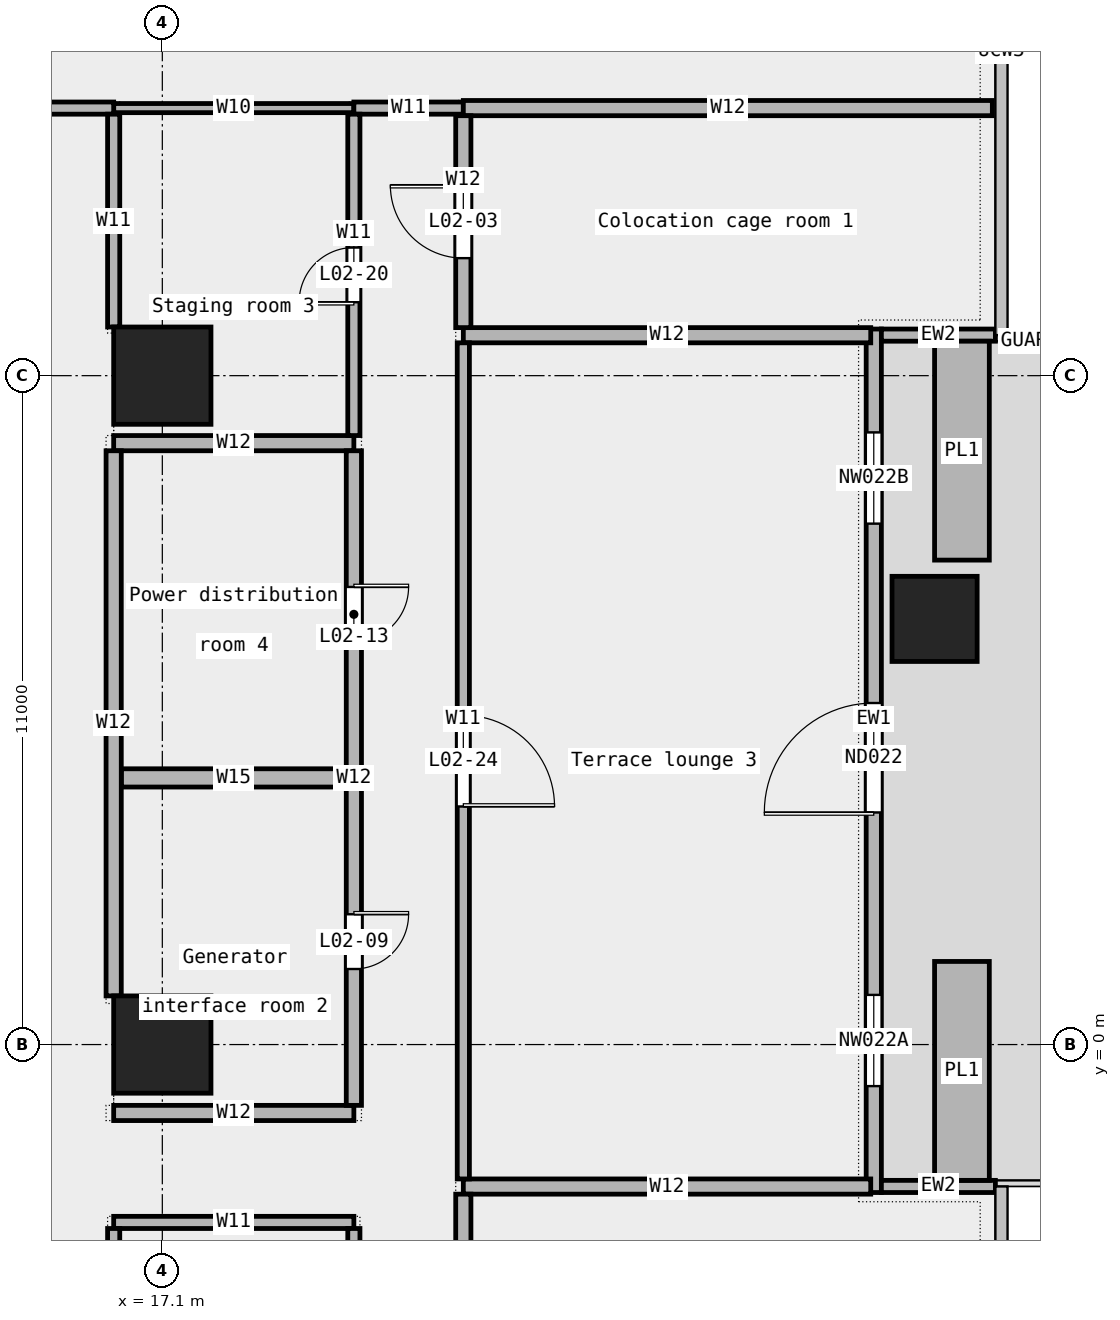
"""IFC4 building model, lengths in metres.
Left out: names, types, materials, properties, quantities, classifications, styles, units other than length and angle.
Written with IfcOpenShell. Run it as: python <this file> out.ifc"""

import sys

from ifc_helpers import new_model, si_unit, direction, frame, frame_2d, origin, origin_2d, place, context, subcontext, project, spatial, rectangle, extrude, element, fill, save


model = new_model("IFC4")
c1 = context("Model", 3, precision=1e-05, world=origin(), true_north=direction((0.0, 1.0)))
c2 = subcontext(c1, "Body", "Model", "MODEL_VIEW")
j1 = project(units=[si_unit("LENGTHUNIT", "METRE"), si_unit("PLANEANGLEUNIT", "RADIAN")], contexts=[c1])
p1 = place(None, origin())
s1 = spatial("IfcSite", under=j1, at=p1, CompositionType="ELEMENT")
p2 = place(p1, origin())
s2 = spatial("IfcBuilding", under=s1, at=p2, CompositionType="ELEMENT")
p3 = place(p2, frame((0.0, 0.0, 14.5)))
s3 = spatial("IfcBuildingStorey", under=s2, at=p3, CompositionType="ELEMENT", Elevation=14.5)
p4 = place(p3, frame((29.8, 7.0, 0.0), z_axis=(0.0, 0.0, 1.0), x_axis=(1.0, 0.0, 0.0)))
e1 = element("IfcColumn", 1, at=p4, inside=s3, PredefinedType="COLUMN", context=c2, shape_type="SweptSolid", body=[
    extrude(rectangle(XDim=1.4, YDim=1.4, at=origin_2d()), origin(), (0.0, 0.0, 1.0), 5.0),
])
for number, where, z_axis, x_axis in (
    (2, (17.1, 0.0, 0.0), (0.0, 0.0, 1.0), (1.0, 0.0, 0.0)),
    (3, (17.1, 11.0, 0.0), (0.0, 0.0, 1.0), (1.0, 0.0, 0.0)),
):
    element("IfcColumn", number, at=place(p3, frame(where, z_axis=z_axis, x_axis=x_axis)), inside=s3, PredefinedType="COLUMN", context=c2, shape_type="SweptSolid", body=[
        extrude(rectangle(XDim=1.6, YDim=1.6, at=origin_2d()), origin(), (0.0, 0.0, 1.0), 5.0),
    ])
p5 = place(p3, frame((28.8, -2.433, 0.0), z_axis=(0.0, 0.0, 1.0), x_axis=(0.0, 1.0, 0.0)))
e4 = element("IfcWall", 4, at=p5, inside=s3, PredefinedType="STANDARD", context=c2, shape_type="SweptSolid", body=[
    extrude(rectangle(XDim=14.2, YDim=0.25, at=frame_2d((7.1, 0.0))), origin(), (0.0, 0.0, 1.0), 5.0),
])
p6 = place(p5, frame((1.75, 0.0, 0.45)))
e5 = element("IfcOpeningElement", 5, at=p6, cuts=e4, PredefinedType="OPENING", context=c2, shape_type="SweptSolid", body=[
    extrude(rectangle(XDim=1.5, YDim=3.0, at=frame_2d((0.75, 1.5))), frame((0.0, 0.137, 0.0), z_axis=(0.0, -1.0, 0.0), x_axis=(1.0, 0.0, 0.0)), (0.0, 0.0, 1.0), 0.274),
])
p7 = place(p5, frame((6.25, 0.0, 0.0)))
e6 = element("IfcOpeningElement", 6, at=p7, cuts=e4, PredefinedType="OPENING", context=c2, shape_type="SweptSolid", body=[
    extrude(rectangle(XDim=1.8, YDim=2.4, at=frame_2d((0.9, 1.2))), frame((0.0, 0.137, 0.0), z_axis=(0.0, -1.0, 0.0), x_axis=(1.0, 0.0, 0.0)), (0.0, 0.0, 1.0), 0.274),
])
p8 = place(p5, frame((11.0, 0.0, 0.45)))
e7 = element("IfcOpeningElement", 7, at=p8, cuts=e4, PredefinedType="OPENING", context=c2, shape_type="SweptSolid", body=[
    extrude(rectangle(XDim=1.5, YDim=3.0, at=frame_2d((0.75, 1.5))), frame((0.0, 0.137, 0.0), z_axis=(0.0, -1.0, 0.0), x_axis=(1.0, 0.0, 0.0)), (0.0, 0.0, 1.0), 0.274),
])
for number, where, z_axis, x_axis in (
    (8, (30.8, -2.333, 0.0), (0.0, 0.0, 1.0), (-1.0, 0.0, 0.0)),
    (9, (30.8, 11.667, 0.0), (0.0, 0.0, 1.0), (-1.0, 0.0, 0.0)),
):
    element("IfcWall", number, at=place(p3, frame(where, z_axis=z_axis, x_axis=x_axis)), inside=s3, PredefinedType="STANDARD", context=c2, shape_type="SweptSolid", body=[
        extrude(rectangle(XDim=1.875, YDim=0.2, at=frame_2d((0.938, 0.0))), origin(), (0.0, 0.0, 1.0), 5.0),
    ])
for number, where, z_axis, x_axis in (
    (10, (30.25, -2.233, 0.0), (0.0, 0.0, 1.0), (0.0, 1.0, 0.0)),
    (11, (30.25, 7.967, 0.0), (0.0, 0.0, 1.0), (0.0, 1.0, 0.0)),
):
    element("IfcWall", number, at=place(p3, frame(where, z_axis=z_axis, x_axis=x_axis)), inside=s3, PredefinedType="STANDARD", context=c2, shape_type="SweptSolid", body=[
        extrude(rectangle(XDim=3.6, YDim=0.9, at=frame_2d((1.8, 0.0))), origin(), (0.0, 0.0, 1.0), 0.7),
    ])
p9 = place(p3, frame((16.3, -2.925, 0.0), z_axis=(0.0, 0.0, 1.0), x_axis=(1.0, 0.0, 0.0)))
e12 = element("IfcWall", 12, at=p9, inside=s3, PredefinedType="PARTITIONING", context=c2, shape_type="SweptSolid", body=[
    extrude(rectangle(XDim=3.95, YDim=0.2, at=frame_2d((1.975, 0.0))), origin(), (0.0, 0.0, 1.0), 5.0),
])
p10 = place(p3, frame((22.05, -2.335, 0.0), z_axis=(0.0, 0.0, 1.0), x_axis=(1.0, 0.0, 0.0)))
e13 = element("IfcWall", 13, at=p10, inside=s3, PredefinedType="PARTITIONING", context=c2, shape_type="SweptSolid", body=[
    extrude(rectangle(XDim=6.7, YDim=0.25, at=frame_2d((3.35, 0.0))), origin(), (0.0, 0.0, 1.0), 5.0),
])
p11 = place(p3, frame((16.3, -1.125, 0.0), z_axis=(0.0, 0.0, 1.0), x_axis=(1.0, 0.0, 0.0)))
e14 = element("IfcWall", 14, at=p11, inside=s3, PredefinedType="PARTITIONING", context=c2, shape_type="SweptSolid", body=[
    extrude(rectangle(XDim=3.95, YDim=0.25, at=frame_2d((1.975, 0.0))), origin(), (0.0, 0.0, 1.0), 5.0),
])
p12 = place(p3, frame((16.425, 4.385, 0.0), z_axis=(0.0, 0.0, 1.0), x_axis=(1.0, 0.0, 0.0)))
e15 = element("IfcWall", 15, at=p12, inside=s3, PredefinedType="PARTITIONING", context=c2, shape_type="SweptSolid", body=[
    extrude(rectangle(XDim=3.7, YDim=0.3, at=frame_2d((1.85, 0.0))), origin(), (0.0, 0.0, 1.0), 5.0),
])
p13 = place(p3, frame((16.3, 9.89, 0.0), z_axis=(0.0, 0.0, 1.0), x_axis=(1.0, 0.0, 0.0)))
e16 = element("IfcWall", 16, at=p13, inside=s3, PredefinedType="PARTITIONING", context=c2, shape_type="SweptSolid", body=[
    extrude(rectangle(XDim=3.95, YDim=0.25, at=frame_2d((1.975, 0.0))), origin(), (0.0, 0.0, 1.0), 5.0),
])
p14 = place(p3, frame((22.05, 11.665, 0.0), z_axis=(0.0, 0.0, 1.0), x_axis=(1.0, 0.0, 0.0)))
e17 = element("IfcWall", 17, at=p14, inside=s3, PredefinedType="PARTITIONING", context=c2, shape_type="SweptSolid", body=[
    extrude(rectangle(XDim=6.7, YDim=0.25, at=frame_2d((3.35, 0.0))), origin(), (0.0, 0.0, 1.0), 5.0),
])
p15 = place(p3, frame((16.3, 15.4, 0.0), z_axis=(0.0, 0.0, 1.0), x_axis=(1.0, 0.0, 0.0)))
e18 = element("IfcWall", 18, at=p15, inside=s3, PredefinedType="PARTITIONING", context=c2, shape_type="SweptSolid", body=[
    extrude(rectangle(XDim=3.95, YDim=0.15, at=frame_2d((1.975, 0.0))), origin(), (0.0, 0.0, 1.0), 5.0),
])
p16 = place(p3, frame((9.165, 15.4, 0.0), z_axis=(0.0, 0.0, 1.0), x_axis=(1.0, 0.0, 0.0)))
e19 = element("IfcWall", 19, at=p16, inside=s3, PredefinedType="PARTITIONING", context=c2, shape_type="SweptSolid", body=[
    extrude(rectangle(XDim=7.135, YDim=0.2, at=frame_2d((3.567, 0.0))), origin(), (0.0, 0.0, 1.0), 5.0),
])
p17 = place(p16, frame((2.667, 0.0, 0.0)))
e20 = element("IfcOpeningElement", 20, at=p17, cuts=e19, PredefinedType="OPENING", context=c2, shape_type="SweptSolid", body=[
    extrude(rectangle(XDim=1.8, YDim=2.1, at=frame_2d((0.9, 1.05))), frame((0.0, 0.112, 0.0), z_axis=(0.0, -1.0, 0.0), x_axis=(1.0, 0.0, 0.0)), (0.0, 0.0, 1.0), 0.224),
])
p18 = place(p3, frame((20.25, 15.4, 0.0), z_axis=(0.0, 0.0, 1.0), x_axis=(1.0, 0.0, 0.0)))
e21 = element("IfcWall", 21, at=p18, inside=s3, PredefinedType="PARTITIONING", context=c2, shape_type="SweptSolid", body=[
    extrude(rectangle(XDim=1.8, YDim=0.2, at=frame_2d((0.9, 0.0))), origin(), (0.0, 0.0, 1.0), 5.0),
])
p19 = place(p3, frame((22.05, 15.4, 0.0), z_axis=(0.0, 0.0, 1.0), x_axis=(1.0, 0.0, 0.0)))
e22 = element("IfcWall", 22, at=p19, inside=s3, PredefinedType="PARTITIONING", context=c2, shape_type="SweptSolid", body=[
    extrude(rectangle(XDim=8.7, YDim=0.25, at=frame_2d((4.35, 0.0))), origin(), (0.0, 0.0, 1.0), 5.0),
])
p20 = place(p3, frame((16.3, -9.0, 0.0), z_axis=(0.0, 0.0, 1.0), x_axis=(0.0, 1.0, 0.0)))
e23 = element("IfcWall", 23, at=p20, inside=s3, PredefinedType="PARTITIONING", context=c2, shape_type="SweptSolid", body=[
    extrude(rectangle(XDim=5.975, YDim=0.2, at=frame_2d((2.988, 0.0))), origin(), (0.0, 0.0, 1.0), 5.0),
])
p21 = place(p3, frame((16.3, 11.8, 0.0), z_axis=(0.0, 0.0, 1.0), x_axis=(0.0, 1.0, 0.0)))
e24 = element("IfcWall", 24, at=p21, inside=s3, PredefinedType="PARTITIONING", context=c2, shape_type="SweptSolid", body=[
    extrude(rectangle(XDim=3.5, YDim=0.2, at=frame_2d((1.75, 0.0))), origin(), (0.0, 0.0, 1.0), 5.0),
])
p22 = place(p3, frame((16.3, 0.8, 0.0), z_axis=(0.0, 0.0, 1.0), x_axis=(0.0, 1.0, 0.0)))
e25 = element("IfcWall", 25, at=p22, inside=s3, PredefinedType="PARTITIONING", context=c2, shape_type="SweptSolid", body=[
    extrude(rectangle(XDim=8.965, YDim=0.25, at=frame_2d((4.482, 0.0))), origin(), (0.0, 0.0, 1.0), 5.0),
])
p23 = place(p3, frame((20.25, -9.0, 0.0), z_axis=(0.0, 0.0, 1.0), x_axis=(0.0, 1.0, 0.0)))
e26 = element("IfcWall", 26, at=p23, inside=s3, PredefinedType="PARTITIONING", context=c2, shape_type="SweptSolid", body=[
    extrude(rectangle(XDim=5.975, YDim=0.2, at=frame_2d((2.988, 0.0))), origin(), (0.0, 0.0, 1.0), 5.0),
])
p24 = place(p23, frame((2.538, 0.0, 0.0)))
e27 = element("IfcOpeningElement", 27, at=p24, cuts=e26, PredefinedType="OPENING", context=c2, shape_type="SweptSolid", body=[
    extrude(rectangle(XDim=0.9, YDim=2.1, at=frame_2d((0.45, 1.05))), frame((0.0, 0.112, 0.0), z_axis=(0.0, -1.0, 0.0), x_axis=(1.0, 0.0, 0.0)), (0.0, 0.0, 1.0), 0.224),
])
p25 = place(p3, frame((20.25, 10.015, 0.0), z_axis=(0.0, 0.0, 1.0), x_axis=(0.0, 1.0, 0.0)))
e28 = element("IfcWall", 28, at=p25, inside=s3, PredefinedType="PARTITIONING", context=c2, shape_type="SweptSolid", body=[
    extrude(rectangle(XDim=5.285, YDim=0.2, at=frame_2d((2.643, 0.0))), origin(), (0.0, 0.0, 1.0), 5.0),
])
p26 = place(p25, frame((2.192, 0.0, 0.0)))
e29 = element("IfcOpeningElement", 29, at=p26, cuts=e28, PredefinedType="OPENING", context=c2, shape_type="SweptSolid", body=[
    extrude(rectangle(XDim=0.9, YDim=2.1, at=frame_2d((0.45, 1.05))), frame((0.0, 0.112, 0.0), z_axis=(0.0, -1.0, 0.0), x_axis=(1.0, 0.0, 0.0)), (0.0, 0.0, 1.0), 0.224),
])
p27 = place(p3, frame((20.25, -1.0, 0.0), z_axis=(0.0, 0.0, 1.0), x_axis=(0.0, 1.0, 0.0)))
e30 = element("IfcWall", 30, at=p27, inside=s3, PredefinedType="PARTITIONING", context=c2, shape_type="SweptSolid", body=[
    extrude(rectangle(XDim=10.765, YDim=0.25, at=frame_2d((5.382, 0.0))), origin(), (0.0, 0.0, 1.0), 5.0),
])
p28 = place(p27, frame((2.242, 0.0, 0.0)))
e31 = element("IfcOpeningElement", 31, at=p28, cuts=e30, PredefinedType="OPENING", context=c2, shape_type="SweptSolid", body=[
    extrude(rectangle(XDim=0.9, YDim=2.1, at=frame_2d((0.45, 1.05))), frame((0.0, 0.137, 0.0), z_axis=(0.0, -1.0, 0.0), x_axis=(1.0, 0.0, 0.0)), (0.0, 0.0, 1.0), 0.274),
])
p29 = place(p27, frame((7.625, 0.0, 0.0)))
e32 = element("IfcOpeningElement", 32, at=p29, cuts=e30, PredefinedType="OPENING", context=c2, shape_type="SweptSolid", body=[
    extrude(rectangle(XDim=0.9, YDim=2.1, at=frame_2d((0.45, 1.05))), frame((0.0, 0.137, 0.0), z_axis=(0.0, -1.0, 0.0), x_axis=(1.0, 0.0, 0.0)), (0.0, 0.0, 1.0), 0.274),
])
p30 = place(p3, frame((22.05, -2.21, 0.0), z_axis=(0.0, 0.0, 1.0), x_axis=(0.0, 1.0, 0.0)))
e33 = element("IfcWall", 33, at=p30, inside=s3, PredefinedType="PARTITIONING", context=c2, shape_type="SweptSolid", body=[
    extrude(rectangle(XDim=13.75, YDim=0.2, at=frame_2d((6.875, 0.0))), origin(), (0.0, 0.0, 1.0), 5.0),
])
p31 = place(p30, frame((6.125, 0.0, 0.0)))
e34 = element("IfcOpeningElement", 34, at=p31, cuts=e33, PredefinedType="OPENING", context=c2, shape_type="SweptSolid", body=[
    extrude(rectangle(XDim=1.5, YDim=2.1, at=frame_2d((0.75, 1.05))), frame((0.0, 0.112, 0.0), z_axis=(0.0, -1.0, 0.0), x_axis=(1.0, 0.0, 0.0)), (0.0, 0.0, 1.0), 0.224),
])
p32 = place(p3, frame((22.05, -8.975, 0.0), z_axis=(0.0, 0.0, 1.0), x_axis=(0.0, 1.0, 0.0)))
e35 = element("IfcWall", 35, at=p32, inside=s3, PredefinedType="PARTITIONING", context=c2, shape_type="SweptSolid", body=[
    extrude(rectangle(XDim=6.515, YDim=0.25, at=frame_2d((3.258, 0.0))), origin(), (0.0, 0.0, 1.0), 5.0),
])
p33 = place(p32, frame((2.657, 0.0, 0.0)))
e36 = element("IfcOpeningElement", 36, at=p33, cuts=e35, PredefinedType="OPENING", context=c2, shape_type="SweptSolid", body=[
    extrude(rectangle(XDim=1.2, YDim=2.1, at=frame_2d((0.6, 1.05))), frame((0.0, 0.137, 0.0), z_axis=(0.0, -1.0, 0.0), x_axis=(1.0, 0.0, 0.0)), (0.0, 0.0, 1.0), 0.274),
])
p34 = place(p3, frame((22.05, 11.79, 0.0), z_axis=(0.0, 0.0, 1.0), x_axis=(0.0, 1.0, 0.0)))
e37 = element("IfcWall", 37, at=p34, inside=s3, PredefinedType="PARTITIONING", context=c2, shape_type="SweptSolid", body=[
    extrude(rectangle(XDim=3.485, YDim=0.25, at=frame_2d((1.742, 0.0))), origin(), (0.0, 0.0, 1.0), 5.0),
])
p35 = place(p34, frame((1.143, 0.0, 0.0)))
e38 = element("IfcOpeningElement", 38, at=p35, cuts=e37, PredefinedType="OPENING", context=c2, shape_type="SweptSolid", body=[
    extrude(rectangle(XDim=1.2, YDim=2.1, at=frame_2d((0.6, 1.05))), frame((0.0, 0.137, 0.0), z_axis=(0.0, -1.0, 0.0), x_axis=(1.0, 0.0, 0.0)), (0.0, 0.0, 1.0), 0.274),
])
p36 = place(p6, origin())
e39 = element("IfcWindow", 39, at=p36, inside=s3, PartitioningType="SINGLE_PANEL", PredefinedType="WINDOW", context=c2, shape_type="SweptSolid", body=[
    extrude(rectangle(XDim=1.5, YDim=3.0, at=frame_2d((0.75, 1.5))), frame((0.0, 0.03, 0.0), z_axis=(0.0, -1.0, 0.0), x_axis=(1.0, 0.0, 0.0)), (0.0, 0.0, 1.0), 0.06),
])
fill(e5, e39)
p37 = place(p7, origin())
e40 = element("IfcDoor", 40, at=p37, inside=s3, OperationType="DOUBLE_DOOR_SINGLE_SWING", PredefinedType="DOOR", context=c2, shape_type="SweptSolid", body=[
    extrude(rectangle(XDim=1.8, YDim=2.4, at=frame_2d((0.9, 1.2))), frame((0.0, 0.025, 0.0), z_axis=(0.0, -1.0, 0.0), x_axis=(1.0, 0.0, 0.0)), (0.0, 0.0, 1.0), 0.05),
])
fill(e6, e40)
p38 = place(p8, origin())
e41 = element("IfcWindow", 41, at=p38, inside=s3, PartitioningType="SINGLE_PANEL", PredefinedType="WINDOW", context=c2, shape_type="SweptSolid", body=[
    extrude(rectangle(XDim=1.5, YDim=3.0, at=frame_2d((0.75, 1.5))), frame((0.0, 0.03, 0.0), z_axis=(0.0, -1.0, 0.0), x_axis=(1.0, 0.0, 0.0)), (0.0, 0.0, 1.0), 0.06),
])
fill(e7, e41)
p39 = place(p35, origin())
e42 = element("IfcDoor", 42, at=p39, inside=s3, OperationType="SINGLE_SWING_RIGHT", PredefinedType="DOOR", context=c2, shape_type="SweptSolid", body=[
    extrude(rectangle(XDim=1.2, YDim=2.1, at=frame_2d((0.6, 1.05))), frame((0.0, 0.025, 0.0), z_axis=(0.0, -1.0, 0.0), x_axis=(1.0, 0.0, 0.0)), (0.0, 0.0, 1.0), 0.05),
])
fill(e38, e42)
p40 = place(p28, origin())
e43 = element("IfcDoor", 43, at=p40, inside=s3, OperationType="SINGLE_SWING_LEFT", PredefinedType="DOOR", context=c2, shape_type="SweptSolid", body=[
    extrude(rectangle(XDim=0.9, YDim=2.1, at=frame_2d((0.45, 1.05))), frame((0.0, 0.025, 0.0), z_axis=(0.0, -1.0, 0.0), x_axis=(1.0, 0.0, 0.0)), (0.0, 0.0, 1.0), 0.05),
])
fill(e31, e43)
p41 = place(p29, origin())
e44 = element("IfcDoor", 44, at=p41, inside=s3, OperationType="SINGLE_SWING_LEFT", PredefinedType="DOOR", context=c2, shape_type="SweptSolid", body=[
    extrude(rectangle(XDim=0.9, YDim=2.1, at=frame_2d((0.45, 1.05))), frame((0.0, 0.025, 0.0), z_axis=(0.0, -1.0, 0.0), x_axis=(1.0, 0.0, 0.0)), (0.0, 0.0, 1.0), 0.05),
])
fill(e32, e44)
p42 = place(p26, origin())
e45 = element("IfcDoor", 45, at=p42, inside=s3, OperationType="SINGLE_SWING_LEFT", PredefinedType="DOOR", context=c2, shape_type="SweptSolid", body=[
    extrude(rectangle(XDim=0.9, YDim=2.1, at=frame_2d((0.45, 1.05))), frame((0.0, 0.025, 0.0), z_axis=(0.0, -1.0, 0.0), x_axis=(1.0, 0.0, 0.0)), (0.0, 0.0, 1.0), 0.05),
])
fill(e29, e45)
p43 = place(p31, origin())
e46 = element("IfcDoor", 46, at=p43, inside=s3, OperationType="DOUBLE_DOOR_SINGLE_SWING", PredefinedType="DOOR", context=c2, shape_type="SweptSolid", body=[
    extrude(rectangle(XDim=1.5, YDim=2.1, at=frame_2d((0.75, 1.05))), frame((0.0, 0.025, 0.0), z_axis=(0.0, -1.0, 0.0), x_axis=(1.0, 0.0, 0.0)), (0.0, 0.0, 1.0), 0.05),
])
fill(e34, e46)
save(model, sys.argv[1])
